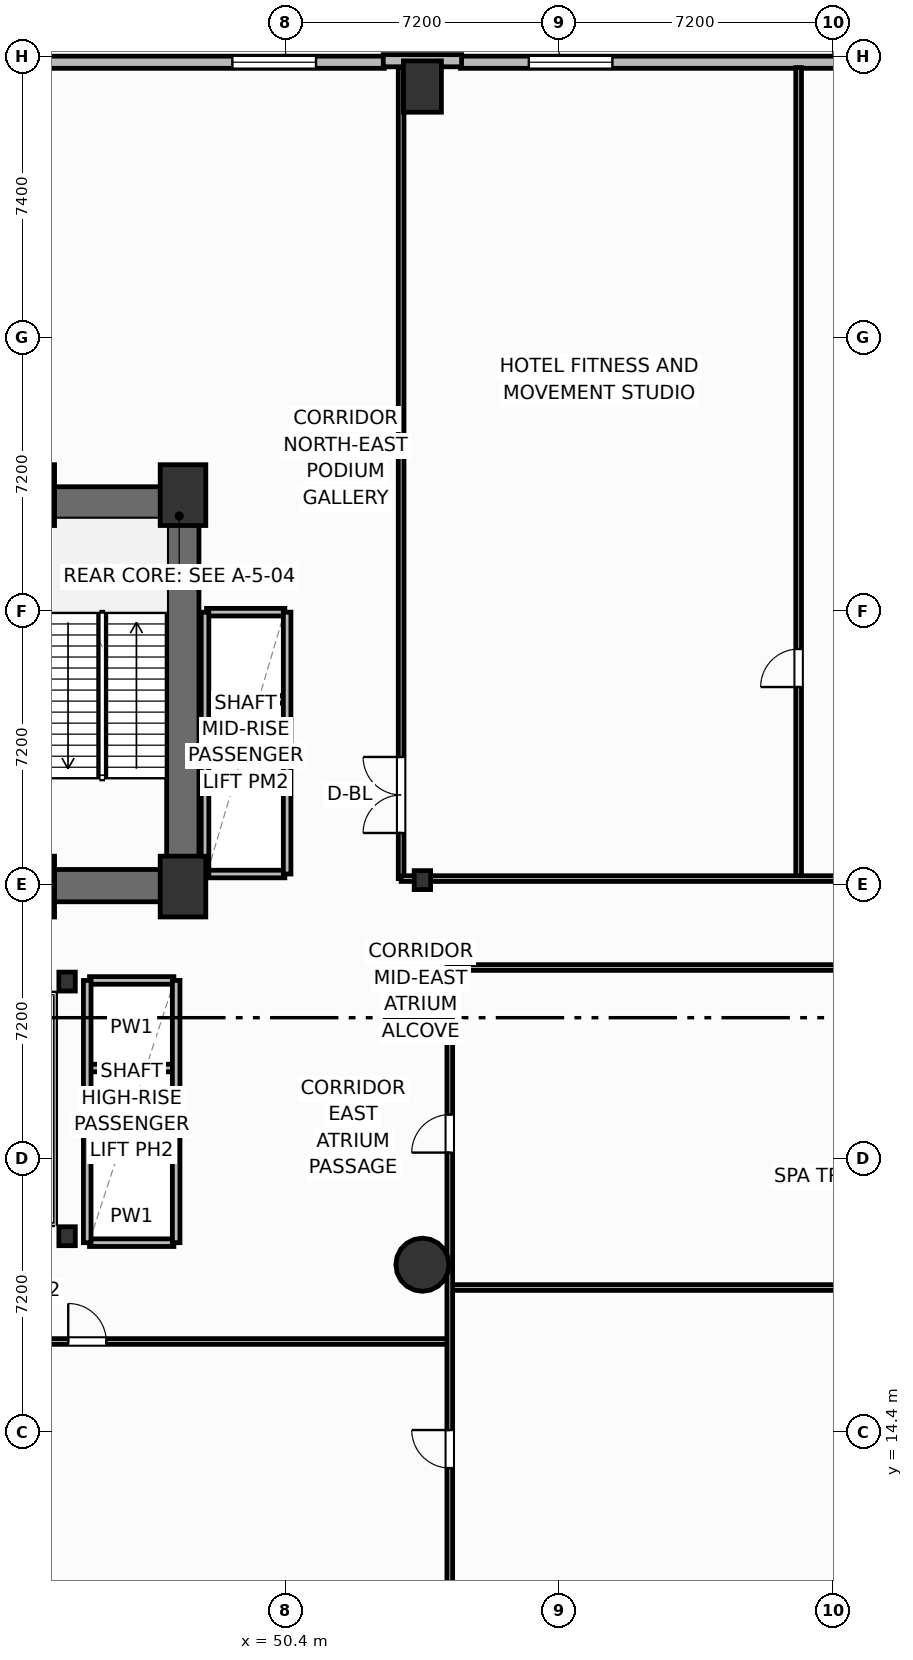
"""IFC4 building model, lengths in metres.
Left out: names, types, materials, properties, quantities, classifications, styles, units other than length and angle.
Written with IfcOpenShell. Run it as: python <this file> out.ifc"""

import sys

from ifc_helpers import new_model, si_unit, direction, frame, frame_2d, origin, origin_2d, place, context, subcontext, project, spatial, rectangle, circle, i_section, extrude, element, fill, save


model = new_model("IFC4")
c1 = context("Model", 3, precision=1e-05, world=origin(), true_north=direction((0.0, 1.0)))
c2 = subcontext(c1, "Body", "Model", "MODEL_VIEW")
j1 = project(units=[si_unit("LENGTHUNIT", "METRE"), si_unit("PLANEANGLEUNIT", "RADIAN")], contexts=[c1])
p1 = place(None, origin())
s1 = spatial("IfcSite", under=j1, at=p1, CompositionType="ELEMENT")
p2 = place(p1, origin())
s2 = spatial("IfcBuilding", under=s1, at=p2, CompositionType="ELEMENT")
p3 = place(p2, frame((0.0, 0.0, 21.6)))
s3 = spatial("IfcBuildingStorey", under=s2, at=p3, CompositionType="ELEMENT", Elevation=21.6)
for number, where, z_axis, x_axis in (
    (1, (43.72, 28.75, 0.0), (0.0, 0.0, 1.0), (1.0, 0.0, 0.0)),
    (2, (47.7, 28.75, 0.0), (0.0, 0.0, 1.0), (1.0, 0.0, 0.0)),
    (3, (43.72, 39.05, 0.0), (0.0, 0.0, 1.0), (1.0, 0.0, 0.0)),
    (4, (47.7, 39.05, 0.0), (0.0, 0.0, 1.0), (1.0, 0.0, 0.0)),
):
    element("IfcColumn", number, at=place(p3, frame(where, z_axis=z_axis, x_axis=x_axis)), inside=s3, PredefinedType="COLUMN", context=c2, shape_type="SweptSolid", body=[
        extrude(rectangle(XDim=1.2, YDim=1.6, at=origin_2d()), origin(), (0.0, 0.0, 1.0), 5.4),
    ])
for number, where, z_axis, x_axis in (
    (5, (44.65, 19.55, 0.0), (0.0, 0.0, 1.0), (1.0, 0.0, 0.0)),
    (6, (44.65, 26.25, 0.0), (0.0, 0.0, 1.0), (1.0, 0.0, 0.0)),
    (7, (54.0, 28.92, 0.0), (0.0, 0.0, 1.0), (1.0, 0.0, 0.0)),
):
    element("IfcColumn", number, at=place(p3, frame(where, z_axis=z_axis, x_axis=x_axis)), inside=s3, PredefinedType="COLUMN", context=c2, shape_type="SweptSolid", body=[
        extrude(i_section(OverallWidth=0.432, OverallDepth=0.498, WebThickness=0.056, FlangeThickness=0.089, FilletRadius=0.025, at=origin_2d()), origin(), (0.0, 0.0, 1.0), 5.4),
    ])
p4 = place(p3, frame((30.28, 38.845, 0.0), z_axis=(0.0, 0.0, 1.0), x_axis=(1.0, 0.0, 0.0)))
e8 = element("IfcWall", 8, at=p4, inside=s3, PredefinedType="SHEAR", context=c2, shape_type="SweptSolid", body=[
    extrude(rectangle(XDim=17.84, YDim=0.85, at=frame_2d((8.92, 0.0))), origin(), (0.0, 0.0, 1.0), 5.15),
])
p5 = place(p3, frame((47.695, 29.2, 0.0), z_axis=(0.0, 0.0, 1.0), x_axis=(0.0, 1.0, 0.0)))
e9 = element("IfcWall", 9, at=p5, inside=s3, PredefinedType="SHEAR", context=c2, shape_type="SweptSolid", body=[
    extrude(rectangle(XDim=9.22, YDim=0.85, at=frame_2d((4.61, 0.0))), origin(), (0.0, 0.0, 1.0), 5.15),
])
p6 = place(p3, frame((43.6, 28.775, 0.0), z_axis=(0.0, 0.0, 1.0), x_axis=(1.0, 0.0, 0.0)))
e10 = element("IfcWall", 10, at=p6, inside=s3, PredefinedType="SHEAR", context=c2, shape_type="SweptSolid", body=[
    extrude(rectangle(XDim=4.52, YDim=0.85, at=frame_2d((2.26, 0.0))), origin(), (0.0, 0.0, 1.0), 5.15),
])
p7 = place(p3, frame((54.0, 18.8, 0.0), z_axis=(0.0, 0.0, 1.0), x_axis=(1.0, 0.0, 0.0)))
e11 = element("IfcColumn", 11, at=p7, inside=s3, PredefinedType="COLUMN", context=c2, shape_type="SweptSolid", body=[
    extrude(circle(Radius=0.7, at=origin_2d()), origin(), (0.0, 0.0, 1.0), 5.4),
])
p8 = place(p3, frame((54.0, 49.8, 0.0), z_axis=(0.0, 0.0, 1.0), x_axis=(1.0, 0.0, 0.0)))
e12 = element("IfcColumn", 12, at=p8, inside=s3, PredefinedType="COLUMN", context=c2, shape_type="SweptSolid", body=[
    extrude(rectangle(XDim=1.0, YDim=1.35, at=origin_2d()), origin(), (0.0, 0.0, 1.0), 5.4),
])
p9 = place(p3, frame((25.4, 50.44, 0.0), z_axis=(0.0, 0.0, 1.0), x_axis=(1.0, 0.0, 0.0)))
e13 = element("IfcWall", 13, at=p9, inside=s3, PredefinedType="SOLIDWALL", context=c2, shape_type="SweptSolid", body=[
    extrude(rectangle(XDim=27.6, YDim=0.32, at=frame_2d((13.8, 0.0))), origin(), (0.0, 0.0, 1.0), 4.1),
])
p10 = place(p9, frame((1.8, 0.0, 0.8)))
e14 = element("IfcOpeningElement", 14, at=p10, cuts=e13, PredefinedType="OPENING", context=c2, shape_type="SweptSolid", body=[
    extrude(rectangle(XDim=2.2, YDim=1.11, at=frame_2d((1.1, 0.555))), frame((0.0, 0.17, 0.0), z_axis=(0.0, -1.0, 0.0), x_axis=(1.0, 0.0, 0.0)), (0.0, 0.0, 1.0), 0.34),
])
p11 = place(p9, frame((23.6, 0.0, 0.8)))
e15 = element("IfcOpeningElement", 15, at=p11, cuts=e13, PredefinedType="OPENING", context=c2, shape_type="SweptSolid", body=[
    extrude(rectangle(XDim=2.2, YDim=1.11, at=frame_2d((1.1, 0.555))), frame((0.0, 0.17, 0.0), z_axis=(0.0, -1.0, 0.0), x_axis=(1.0, 0.0, 0.0)), (0.0, 0.0, 1.0), 0.34),
])
p12 = place(p3, frame((55.0, 50.44, 0.0), z_axis=(0.0, 0.0, 1.0), x_axis=(1.0, 0.0, 0.0)))
e16 = element("IfcWall", 16, at=p12, inside=s3, PredefinedType="SOLIDWALL", context=c2, shape_type="SweptSolid", body=[
    extrude(rectangle(XDim=15.2, YDim=0.32, at=frame_2d((7.6, 0.0))), origin(), (0.0, 0.0, 1.0), 4.1),
])
p13 = place(p12, frame((1.8, 0.0, 0.8)))
e17 = element("IfcOpeningElement", 17, at=p13, cuts=e16, PredefinedType="OPENING", context=c2, shape_type="SweptSolid", body=[
    extrude(rectangle(XDim=2.2, YDim=1.11, at=frame_2d((1.1, 0.555))), frame((0.0, 0.17, 0.0), z_axis=(0.0, -1.0, 0.0), x_axis=(1.0, 0.0, 0.0)), (0.0, 0.0, 1.0), 0.34),
])
p14 = place(p12, frame((11.2, 0.0, 0.8)))
e18 = element("IfcOpeningElement", 18, at=p14, cuts=e16, PredefinedType="OPENING", context=c2, shape_type="SweptSolid", body=[
    extrude(rectangle(XDim=2.2, YDim=1.11, at=frame_2d((1.1, 0.555))), frame((0.0, 0.17, 0.0), z_axis=(0.0, -1.0, 0.0), x_axis=(1.0, 0.0, 0.0)), (0.0, 0.0, 1.0), 0.34),
])
p15 = place(p3, frame((55.03, 50.48, 0.0), z_axis=(0.0, 0.0, 1.0), x_axis=(-1.0, 0.0, 0.0)))
e19 = element("IfcWall", 19, at=p15, inside=s3, PredefinedType="SOLIDWALL", context=c2, shape_type="SweptSolid", body=[
    extrude(rectangle(XDim=2.06, YDim=0.32, at=frame_2d((1.03, 0.0))), origin(), (0.0, 0.0, 1.0), 4.1),
])
p16 = place(p3, frame((54.72, 18.2, 0.0), z_axis=(0.0, 0.0, 1.0), x_axis=(1.0, 0.0, 0.0)))
e20 = element("IfcWall", 20, at=p16, inside=s3, PredefinedType="PARTITIONING", context=c2, shape_type="SweptSolid", body=[
    extrude(rectangle(XDim=23.48, YDim=0.15, at=frame_2d((11.74, 0.0))), origin(), (0.0, 0.0, 1.0), 1.935),
])
p17 = place(p3, frame((63.9, 28.96, 0.0), z_axis=(0.0, 0.0, 1.0), x_axis=(0.0, 1.0, 0.0)))
e21 = element("IfcWall", 21, at=p17, inside=s3, PredefinedType="PARTITIONING", context=c2, shape_type="SweptSolid", body=[
    extrude(rectangle(XDim=21.34, YDim=0.15, at=frame_2d((10.67, 0.0))), origin(), (0.0, 0.0, 1.0), 5.15),
])
p18 = place(p17, frame((5.04, 0.0, 0.0)))
e22 = element("IfcOpeningElement", 22, at=p18, cuts=e21, PredefinedType="OPENING", context=c2, shape_type="SweptSolid", body=[
    extrude(rectangle(XDim=1.0, YDim=2.05, at=frame_2d((0.5, 1.025))), frame((0.0, 0.085, 0.0), z_axis=(0.0, -1.0, 0.0), x_axis=(1.0, 0.0, 0.0)), (0.0, 0.0, 1.0), 0.17),
])
p19 = place(p3, frame((23.68, 16.78, 0.0), z_axis=(0.0, 0.0, 1.0), x_axis=(1.0, 0.0, 0.0)))
e23 = element("IfcWall", 23, at=p19, inside=s3, PredefinedType="PARTITIONING", context=c2, shape_type="SweptSolid", body=[
    extrude(rectangle(XDim=31.04, YDim=0.15, at=frame_2d((15.52, 0.0))), origin(), (0.0, 0.0, 1.0), 5.15),
])
p20 = place(p19, frame((6.5, 0.0, 0.0)))
e24 = element("IfcOpeningElement", 24, at=p20, cuts=e23, PredefinedType="OPENING", context=c2, shape_type="SweptSolid", body=[
    extrude(rectangle(XDim=1.0, YDim=2.05, at=frame_2d((0.5, 1.025))), frame((0.0, 0.085, 0.0), z_axis=(0.0, -1.0, 0.0), x_axis=(1.0, 0.0, 0.0)), (0.0, 0.0, 1.0), 0.17),
])
p21 = place(p19, frame((21.0, 0.0, 0.0)))
e25 = element("IfcOpeningElement", 25, at=p21, cuts=e23, PredefinedType="OPENING", context=c2, shape_type="SweptSolid", body=[
    extrude(rectangle(XDim=1.0, YDim=2.05, at=frame_2d((0.5, 1.025))), frame((0.0, 0.085, 0.0), z_axis=(0.0, -1.0, 0.0), x_axis=(1.0, 0.0, 0.0)), (0.0, 0.0, 1.0), 0.17),
])
p22 = place(p3, frame((54.72, 0.25, 0.0), z_axis=(0.0, 0.0, 1.0), x_axis=(0.0, 1.0, 0.0)))
e26 = element("IfcWall", 26, at=p22, inside=s3, PredefinedType="PARTITIONING", context=c2, shape_type="SweptSolid", body=[
    extrude(rectangle(XDim=26.37, YDim=0.15, at=frame_2d((13.185, 0.0))), origin(), (0.0, 0.0, 1.0), 5.15),
])
p23 = place(p22, frame((21.5, 0.0, 0.0)))
e27 = element("IfcOpeningElement", 27, at=p23, cuts=e26, PredefinedType="OPENING", context=c2, shape_type="SweptSolid", body=[
    extrude(rectangle(XDim=1.0, YDim=2.05, at=frame_2d((0.5, 1.025))), frame((0.0, 0.085, 0.0), z_axis=(0.0, -1.0, 0.0), x_axis=(1.0, 0.0, 0.0)), (0.0, 0.0, 1.0), 0.17),
])
p24 = place(p22, frame((13.2, 0.0, 0.0)))
e28 = element("IfcOpeningElement", 28, at=p24, cuts=e26, PredefinedType="OPENING", context=c2, shape_type="SweptSolid", body=[
    extrude(rectangle(XDim=1.0, YDim=2.05, at=frame_2d((0.5, 1.025))), frame((0.0, 0.085, 0.0), z_axis=(0.0, -1.0, 0.0), x_axis=(1.0, 0.0, 0.0)), (0.0, 0.0, 1.0), 0.17),
])
p25 = place(p3, frame((54.72, 26.62, 0.0), z_axis=(0.0, 0.0, 1.0), x_axis=(1.0, 0.0, 0.0)))
e29 = element("IfcWall", 29, at=p25, inside=s3, PredefinedType="PARTITIONING", context=c2, shape_type="SweptSolid", body=[
    extrude(rectangle(XDim=23.48, YDim=0.15, at=frame_2d((11.74, 0.0))), origin(), (0.0, 0.0, 1.0), 5.15),
])
p26 = place(p3, frame((53.44, 28.96, 0.0), z_axis=(0.0, 0.0, 1.0), x_axis=(0.0, 1.0, 0.0)))
e30 = element("IfcWall", 30, at=p26, inside=s3, PredefinedType="PARTITIONING", context=c2, shape_type="SweptSolid", body=[
    extrude(rectangle(XDim=21.34, YDim=0.15, at=frame_2d((10.67, 0.0))), origin(), (0.0, 0.0, 1.0), 5.15),
])
p27 = place(p26, frame((1.2, 0.0, 0.0)))
e31 = element("IfcOpeningElement", 31, at=p27, cuts=e30, PredefinedType="OPENING", context=c2, shape_type="SweptSolid", body=[
    extrude(rectangle(XDim=2.0, YDim=2.05, at=frame_2d((1.0, 1.025))), frame((0.0, 0.085, 0.0), z_axis=(0.0, -1.0, 0.0), x_axis=(1.0, 0.0, 0.0)), (0.0, 0.0, 1.0), 0.17),
])
p28 = place(p3, frame((53.44, 28.96, 0.0), z_axis=(0.0, 0.0, 1.0), x_axis=(1.0, 0.0, 0.0)))
e32 = element("IfcWall", 32, at=p28, inside=s3, PredefinedType="PARTITIONING", context=c2, shape_type="SweptSolid", body=[
    extrude(rectangle(XDim=24.76, YDim=0.15, at=frame_2d((12.38, 0.0))), origin(), (0.0, 0.0, 1.0), 1.935),
])
for number, where, z_axis, x_axis in (
    (33, (48.32, 31.375, 0.0), (0.0, 0.0, 1.0), (1.0, 0.0, 0.0)),
    (34, (48.32, 33.675, 0.0), (0.0, 0.0, 1.0), (1.0, 0.0, 0.0)),
):
    element("IfcWall", number, at=place(p3, frame(where, z_axis=z_axis, x_axis=x_axis)), inside=s3, PredefinedType="PARTITIONING", context=c2, shape_type="SweptSolid", body=[
        extrude(rectangle(XDim=2.06, YDim=0.2, at=frame_2d((1.03, 0.0))), origin(), (0.0, 0.0, 1.0), 5.15),
    ])
p29 = place(p3, frame((48.32, 29.08, 0.0), z_axis=(0.0, 0.0, 1.0), x_axis=(1.0, 0.0, 0.0)))
e35 = element("IfcWall", 35, at=p29, inside=s3, PredefinedType="PARTITIONING", context=c2, shape_type="SweptSolid", body=[
    extrude(rectangle(XDim=2.06, YDim=0.2, at=frame_2d((1.03, 0.0))), origin(), (0.0, 0.0, 1.0), 4.362),
])
p30 = place(p3, frame((48.32, 35.97, 0.0), z_axis=(0.0, 0.0, 1.0), x_axis=(1.0, 0.0, 0.0)))
e36 = element("IfcWall", 36, at=p30, inside=s3, PredefinedType="PARTITIONING", context=c2, shape_type="SweptSolid", body=[
    extrude(rectangle(XDim=2.06, YDim=0.2, at=frame_2d((1.03, 0.0))), origin(), (0.0, 0.0, 1.0), 5.15),
])
for number, where, z_axis, x_axis in (
    (37, (48.28, 29.08, 0.0), (0.0, 0.0, 1.0), (0.0, 1.0, 0.0)),
    (38, (50.44, 29.08, 0.0), (0.0, 0.0, 1.0), (0.0, 1.0, 0.0)),
):
    element("IfcWall", number, at=place(p3, frame(where, z_axis=z_axis, x_axis=x_axis)), inside=s3, PredefinedType="PARTITIONING", context=c2, shape_type="SweptSolid", body=[
        extrude(rectangle(XDim=6.89, YDim=0.2, at=frame_2d((3.445, 0.0))), origin(), (0.0, 0.0, 1.0), 5.15),
    ])
for number, where, z_axis, x_axis in (
    (39, (45.24, 21.675, 0.0), (0.0, 0.0, 1.0), (1.0, 0.0, 0.0)),
    (40, (45.24, 23.975, 0.0), (0.0, 0.0, 1.0), (1.0, 0.0, 0.0)),
):
    element("IfcWall", number, at=place(p3, frame(where, z_axis=z_axis, x_axis=x_axis)), inside=s3, PredefinedType="PARTITIONING", context=c2, shape_type="SweptSolid", body=[
        extrude(rectangle(XDim=2.22, YDim=0.2, at=frame_2d((1.11, 0.0))), origin(), (0.0, 0.0, 1.0), 5.15),
    ])
p31 = place(p3, frame((45.24, 19.38, 0.0), z_axis=(0.0, 0.0, 1.0), x_axis=(1.0, 0.0, 0.0)))
e41 = element("IfcWall", 41, at=p31, inside=s3, PredefinedType="PARTITIONING", context=c2, shape_type="SweptSolid", body=[
    extrude(rectangle(XDim=2.22, YDim=0.2, at=frame_2d((1.11, 0.0))), origin(), (0.0, 0.0, 1.0), 4.362),
])
p32 = place(p3, frame((45.24, 26.28, 0.0), z_axis=(0.0, 0.0, 1.0), x_axis=(1.0, 0.0, 0.0)))
e42 = element("IfcWall", 42, at=p32, inside=s3, PredefinedType="PARTITIONING", context=c2, shape_type="SweptSolid", body=[
    extrude(rectangle(XDim=2.22, YDim=0.2, at=frame_2d((1.11, 0.0))), origin(), (0.0, 0.0, 1.0), 5.15),
])
for number, where, z_axis, x_axis in (
    (43, (45.18, 19.38, 0.0), (0.0, 0.0, 1.0), (0.0, 1.0, 0.0)),
    (44, (47.52, 19.38, 0.0), (0.0, 0.0, 1.0), (0.0, 1.0, 0.0)),
):
    element("IfcWall", number, at=place(p3, frame(where, z_axis=z_axis, x_axis=x_axis)), inside=s3, PredefinedType="PARTITIONING", context=c2, shape_type="SweptSolid", body=[
        extrude(rectangle(XDim=6.9, YDim=0.2, at=frame_2d((3.45, 0.0))), origin(), (0.0, 0.0, 1.0), 5.15),
    ])
p33 = place(p11, origin())
e45 = element("IfcWindow", 45, at=p33, inside=s3, PartitioningType="SINGLE_PANEL", PredefinedType="WINDOW", context=c2, shape_type="SweptSolid", body=[
    extrude(rectangle(XDim=2.2, YDim=1.11, at=frame_2d((1.1, 0.555))), frame((0.0, 0.03, 0.0), z_axis=(0.0, -1.0, 0.0), x_axis=(1.0, 0.0, 0.0)), (0.0, 0.0, 1.0), 0.06),
])
fill(e15, e45)
p34 = place(p13, origin())
e46 = element("IfcWindow", 46, at=p34, inside=s3, PartitioningType="SINGLE_PANEL", PredefinedType="WINDOW", context=c2, shape_type="SweptSolid", body=[
    extrude(rectangle(XDim=2.2, YDim=1.11, at=frame_2d((1.1, 0.555))), frame((0.0, 0.03, 0.0), z_axis=(0.0, -1.0, 0.0), x_axis=(1.0, 0.0, 0.0)), (0.0, 0.0, 1.0), 0.06),
])
fill(e17, e46)
p35 = place(p18, origin())
e47 = element("IfcDoor", 47, at=p35, inside=s3, OperationType="SINGLE_SWING_LEFT", PredefinedType="DOOR", context=c2, shape_type="SweptSolid", body=[
    extrude(rectangle(XDim=1.0, YDim=2.05, at=frame_2d((0.5, 1.025))), frame((0.0, 0.025, 0.0), z_axis=(0.0, -1.0, 0.0), x_axis=(1.0, 0.0, 0.0)), (0.0, 0.0, 1.0), 0.05),
])
fill(e22, e47)
p36 = place(p21, origin())
e48 = element("IfcDoor", 48, at=p36, inside=s3, OperationType="SINGLE_SWING_LEFT", PredefinedType="DOOR", context=c2, shape_type="SweptSolid", body=[
    extrude(rectangle(XDim=1.0, YDim=2.05, at=frame_2d((0.5, 1.025))), frame((0.0, 0.025, 0.0), z_axis=(0.0, -1.0, 0.0), x_axis=(1.0, 0.0, 0.0)), (0.0, 0.0, 1.0), 0.05),
])
fill(e25, e48)
p37 = place(p23, origin())
e49 = element("IfcDoor", 49, at=p37, inside=s3, OperationType="SINGLE_SWING_LEFT", PredefinedType="DOOR", context=c2, shape_type="SweptSolid", body=[
    extrude(rectangle(XDim=1.0, YDim=2.05, at=frame_2d((0.5, 1.025))), frame((0.0, 0.025, 0.0), z_axis=(0.0, -1.0, 0.0), x_axis=(1.0, 0.0, 0.0)), (0.0, 0.0, 1.0), 0.05),
])
fill(e27, e49)
p38 = place(p24, origin())
e50 = element("IfcDoor", 50, at=p38, inside=s3, OperationType="SINGLE_SWING_RIGHT", PredefinedType="DOOR", context=c2, shape_type="SweptSolid", body=[
    extrude(rectangle(XDim=1.0, YDim=2.05, at=frame_2d((0.5, 1.025))), frame((0.0, 0.025, 0.0), z_axis=(0.0, -1.0, 0.0), x_axis=(1.0, 0.0, 0.0)), (0.0, 0.0, 1.0), 0.05),
])
fill(e28, e50)
p39 = place(p27, origin())
e51 = element("IfcDoor", 51, at=p39, inside=s3, OperationType="DOUBLE_DOOR_SINGLE_SWING", PredefinedType="DOOR", context=c2, shape_type="SweptSolid", body=[
    extrude(rectangle(XDim=2.0, YDim=2.05, at=frame_2d((1.0, 1.025))), frame((0.0, 0.025, 0.0), z_axis=(0.0, -1.0, 0.0), x_axis=(1.0, 0.0, 0.0)), (0.0, 0.0, 1.0), 0.05),
])
fill(e31, e51)
save(model, sys.argv[1])
